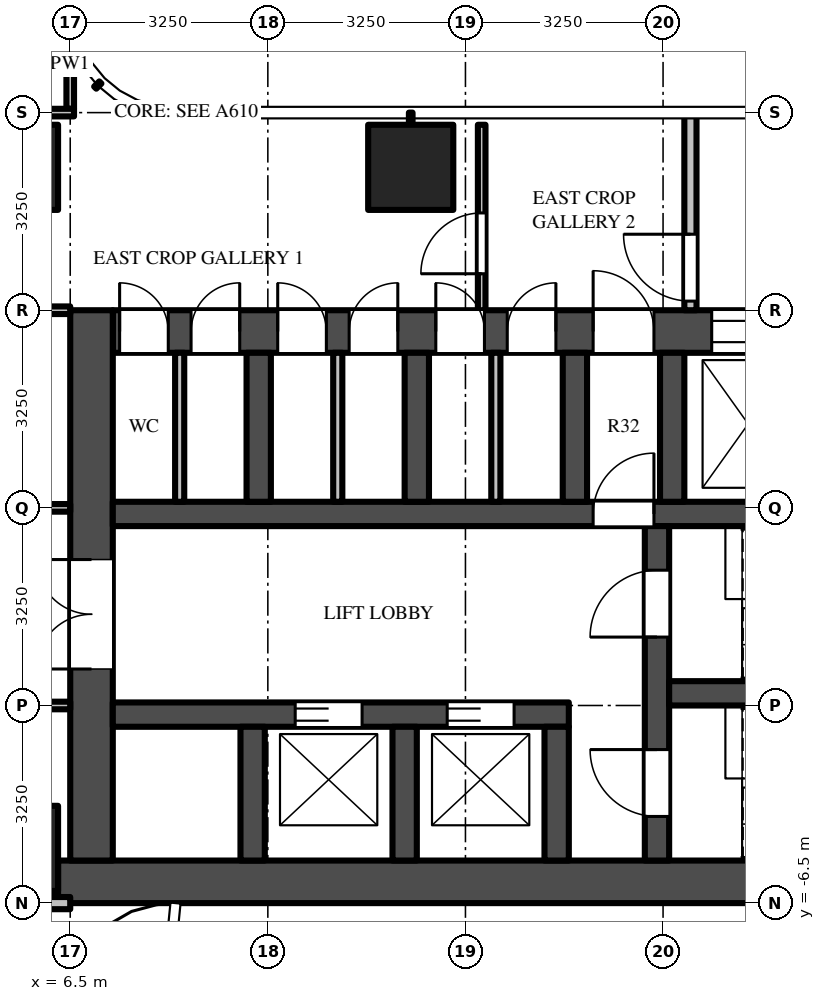
"""IFC4 building model, lengths in metres.
Left out: names, types, materials, properties, quantities, classifications, styles, units other than length and angle.
Written with IfcOpenShell. Run it as: python <this file> out.ifc"""

import sys

from ifc_helpers import new_model, si_unit, direction, frame, frame_2d, origin, origin_2d, place, context, subcontext, project, spatial, rectangle, extrude, source, transform, mapped, element, fill, save


model = new_model("IFC4")
c1 = context("Model", 3, precision=1e-05, world=origin(), true_north=direction((0.0, 1.0)))
c2 = subcontext(c1, "Body", "Model", "MODEL_VIEW")
j1 = project(units=[si_unit("LENGTHUNIT", "METRE"), si_unit("PLANEANGLEUNIT", "RADIAN")], contexts=[c1])
p1 = place(None, origin())
s1 = spatial("IfcSite", under=j1, at=p1, CompositionType="ELEMENT")
p2 = place(p1, origin())
s2 = spatial("IfcBuilding", under=s1, at=p2, CompositionType="ELEMENT")
p3 = place(p2, frame((0.0, 0.0, 83.5)))
s3 = spatial("IfcBuildingStorey", under=s2, at=p3, CompositionType="ELEMENT", Elevation=83.5)
m1 = source(origin(), c2, "Body", "SweptSolid", [
    extrude(rectangle(XDim=1.4, YDim=1.4, at=origin_2d()), origin(), (0.0, 0.0, 1.0), 4.5),
])
for number, where, z_axis, x_axis in (
    (1, (12.1, 5.6, 0.0), (0.0, 0.0, 1.0), (1.0, 0.0, 0.0)),
    (2, (5.6, 5.6, 0.0), (0.0, 0.0, 1.0), (1.0, 0.0, 0.0)),
    (3, (5.6, -5.6, 0.0), (0.0, 0.0, 1.0), (1.0, 0.0, 0.0)),
):
    element("IfcColumn", number, at=place(p3, frame(where, z_axis=z_axis, x_axis=x_axis)), inside=s3, PredefinedType="COLUMN", context=c2, shape_type="MappedRepresentation", body=[
        mapped(m1, transform((0.0, 0.0, 0.0))),
    ])
m2 = source(origin(), c2, "Body", "SweptSolid", [
    extrude(rectangle(XDim=16.45, YDim=0.7, at=frame_2d((8.225, 0.0))), origin(), (0.0, 0.0, 1.0), 4.25),
])
p4 = place(p3, frame((6.3, -6.15, 0.0), z_axis=(0.0, 0.0, 1.0), x_axis=(1.0, 0.0, 0.0)))
e4 = element("IfcWall", 4, at=p4, inside=s3, PredefinedType="SHEAR", context=c2, shape_type="MappedRepresentation", body=[
    mapped(m2, transform((0.0, 0.0, 0.0))),
])
m3 = source(origin(), c2, "Body", "SweptSolid", [
    extrude(rectangle(XDim=14.85, YDim=0.7, at=frame_2d((7.425, 0.0))), origin(), (0.0, 0.0, 1.0), 4.25),
])
p5 = place(p3, frame((7.2, 2.9, 0.0), z_axis=(0.0, 0.0, 1.0), x_axis=(1.0, 0.0, 0.0)))
e5 = element("IfcWall", 5, at=p5, inside=s3, PredefinedType="SHEAR", context=c2, shape_type="MappedRepresentation", body=[
    mapped(m3, transform((0.0, 0.0, 0.0))),
])
m4 = source(origin(), c2, "Body", "SweptSolid", [
    extrude(rectangle(XDim=1.3, YDim=2.1, at=frame_2d((0.65, 1.05))), frame((0.0, 0.36, 0.0), z_axis=(0.0, -1.0, 0.0), x_axis=(1.0, 0.0, 0.0)), (0.0, 0.0, 1.0), 0.72),
])
p6 = place(p5, frame((12.2, 0.0, 0.0)))
e6 = element("IfcOpeningElement", 6, at=p6, cuts=e5, PredefinedType="OPENING", context=c2, shape_type="MappedRepresentation", body=[
    mapped(m4, transform((0.0, 0.0, 0.0))),
])
m5 = source(origin(), c2, "Body", "SweptSolid", [
    extrude(rectangle(XDim=1.2, YDim=2.1, at=frame_2d((0.6, 1.05))), frame((0.0, 0.36, 0.0), z_axis=(0.0, -1.0, 0.0), x_axis=(1.0, 0.0, 0.0)), (0.0, 0.0, 1.0), 0.72),
])
p7 = place(p5, frame((9.85, 0.0, 0.0)))
e7 = element("IfcOpeningElement", 7, at=p7, cuts=e5, PredefinedType="OPENING", context=c2, shape_type="MappedRepresentation", body=[
    mapped(m5, transform((0.0, 0.0, 0.0))),
])
m6 = source(origin(), c2, "Body", "SweptSolid", [
    extrude(rectangle(XDim=1.0, YDim=2.1, at=frame_2d((0.5, 1.05))), frame((0.0, 0.36, 0.0), z_axis=(0.0, -1.0, 0.0), x_axis=(1.0, 0.0, 0.0)), (0.0, 0.0, 1.0), 0.72),
])
p8 = place(p5, frame((7.9, 0.0, 0.0)))
e8 = element("IfcOpeningElement", 8, at=p8, cuts=e5, PredefinedType="OPENING", context=c2, shape_type="MappedRepresentation", body=[
    mapped(m6, transform((0.0, 0.0, 0.0))),
])
m7 = source(origin(), c2, "Body", "SweptSolid", [
    extrude(rectangle(XDim=0.8, YDim=2.1, at=frame_2d((0.4, 1.05))), frame((0.0, 0.36, 0.0), z_axis=(0.0, -1.0, 0.0), x_axis=(1.0, 0.0, 0.0)), (0.0, 0.0, 1.0), 0.72),
])
p9 = place(p5, frame((0.113, 0.0, 0.0)))
e9 = element("IfcOpeningElement", 9, at=p9, cuts=e5, PredefinedType="OPENING", context=c2, shape_type="MappedRepresentation", body=[
    mapped(m7, transform((0.0, 0.0, 0.0))),
])
p10 = place(p5, frame((1.288, 0.0, 0.0)))
e10 = element("IfcOpeningElement", 10, at=p10, cuts=e5, PredefinedType="OPENING", context=c2, shape_type="MappedRepresentation", body=[
    mapped(m7, transform((0.0, 0.0, 0.0))),
])
p11 = place(p5, frame((2.712, 0.0, 0.0)))
e11 = element("IfcOpeningElement", 11, at=p11, cuts=e5, PredefinedType="OPENING", context=c2, shape_type="MappedRepresentation", body=[
    mapped(m7, transform((0.0, 0.0, 0.0))),
])
p12 = place(p5, frame((3.887, 0.0, 0.0)))
e12 = element("IfcOpeningElement", 12, at=p12, cuts=e5, PredefinedType="OPENING", context=c2, shape_type="MappedRepresentation", body=[
    mapped(m7, transform((0.0, 0.0, 0.0))),
])
p13 = place(p5, frame((5.312, 0.0, 0.0)))
e13 = element("IfcOpeningElement", 13, at=p13, cuts=e5, PredefinedType="OPENING", context=c2, shape_type="MappedRepresentation", body=[
    mapped(m7, transform((0.0, 0.0, 0.0))),
])
p14 = place(p5, frame((6.488, 0.0, 0.0)))
e14 = element("IfcOpeningElement", 14, at=p14, cuts=e5, PredefinedType="OPENING", context=c2, shape_type="MappedRepresentation", body=[
    mapped(m7, transform((0.0, 0.0, 0.0))),
])
m8 = source(origin(), c2, "Body", "SweptSolid", [
    extrude(rectangle(XDim=9.05, YDim=0.7, at=frame_2d((4.525, 0.0))), origin(), (0.0, 0.0, 1.0), 4.25),
])
p15 = place(p3, frame((6.85, -5.8, 0.0), z_axis=(0.0, 0.0, 1.0), x_axis=(0.0, 1.0, 0.0)))
e15 = element("IfcWall", 15, at=p15, inside=s3, PredefinedType="SHEAR", context=c2, shape_type="MappedRepresentation", body=[
    mapped(m8, transform((0.0, 0.0, 0.0))),
])
m9 = source(origin(), c2, "Body", "SweptSolid", [
    extrude(rectangle(XDim=1.8, YDim=2.1, at=frame_2d((0.9, 1.05))), frame((0.0, 0.36, 0.0), z_axis=(0.0, -1.0, 0.0), x_axis=(1.0, 0.0, 0.0)), (0.0, 0.0, 1.0), 0.72),
])
p16 = place(p15, frame((3.15, 0.0, 0.0)))
e16 = element("IfcOpeningElement", 16, at=p16, cuts=e15, PredefinedType="OPENING", context=c2, shape_type="MappedRepresentation", body=[
    mapped(m9, transform((0.0, 0.0, 0.0))),
])
m10 = source(origin(), c2, "Body", "SweptSolid", [
    extrude(rectangle(XDim=7.5, YDim=0.4, at=frame_2d((3.75, 0.0))), origin(), (0.0, 0.0, 1.0), 4.25),
])
p17 = place(p3, frame((7.2, -3.4, 0.0), z_axis=(0.0, 0.0, 1.0), x_axis=(1.0, 0.0, 0.0)))
e17 = element("IfcWall", 17, at=p17, inside=s3, PredefinedType="SHEAR", context=c2, shape_type="MappedRepresentation", body=[
    mapped(m10, transform((0.0, 0.0, 0.0))),
])
m11 = source(origin(), c2, "Body", "SweptSolid", [
    extrude(rectangle(XDim=1.1, YDim=2.1, at=frame_2d((0.55, 1.05))), frame((0.0, 0.21, 0.0), z_axis=(0.0, -1.0, 0.0), x_axis=(1.0, 0.0, 0.0)), (0.0, 0.0, 1.0), 0.42),
])
p18 = place(p17, frame((3.0, 0.0, 0.0)))
e18 = element("IfcOpeningElement", 18, at=p18, cuts=e17, PredefinedType="OPENING", context=c2, shape_type="MappedRepresentation", body=[
    mapped(m11, transform((0.0, 0.0, 0.0))),
])
p19 = place(p17, frame((5.5, 0.0, 0.0)))
e19 = element("IfcOpeningElement", 19, at=p19, cuts=e17, PredefinedType="OPENING", context=c2, shape_type="MappedRepresentation", body=[
    mapped(m11, transform((0.0, 0.0, 0.0))),
])
m12 = source(origin(), c2, "Body", "SweptSolid", [
    extrude(rectangle(XDim=14.85, YDim=0.4, at=frame_2d((7.425, 0.0))), origin(), (0.0, 0.0, 1.0), 4.25),
])
p20 = place(p3, frame((7.2, -0.1, 0.0), z_axis=(0.0, 0.0, 1.0), x_axis=(1.0, 0.0, 0.0)))
e20 = element("IfcWall", 20, at=p20, inside=s3, PredefinedType="SHEAR", context=c2, shape_type="MappedRepresentation", body=[
    mapped(m12, transform((0.0, 0.0, 0.0))),
])
m13 = source(origin(), c2, "Body", "SweptSolid", [
    extrude(rectangle(XDim=1.0, YDim=2.1, at=frame_2d((0.5, 1.05))), frame((0.0, 0.21, 0.0), z_axis=(0.0, -1.0, 0.0), x_axis=(1.0, 0.0, 0.0)), (0.0, 0.0, 1.0), 0.42),
])
p21 = place(p20, frame((7.9, 0.0, 0.0)))
e21 = element("IfcOpeningElement", 21, at=p21, cuts=e20, PredefinedType="OPENING", context=c2, shape_type="MappedRepresentation", body=[
    mapped(m13, transform((0.0, 0.0, 0.0))),
])
m14 = source(origin(), c2, "Body", "SweptSolid", [
    extrude(rectangle(XDim=5.5, YDim=0.4, at=frame_2d((2.75, 0.0))), origin(), (0.0, 0.0, 1.0), 4.25),
])
p22 = place(p3, frame((16.15, -5.8, 0.0), z_axis=(0.0, 0.0, 1.0), x_axis=(0.0, 1.0, 0.0)))
e22 = element("IfcWall", 22, at=p22, inside=s3, PredefinedType="SHEAR", context=c2, shape_type="MappedRepresentation", body=[
    mapped(m14, transform((0.0, 0.0, 0.0))),
])
p23 = place(p22, frame((0.725, 0.0, 0.0)))
e23 = element("IfcOpeningElement", 23, at=p23, cuts=e22, PredefinedType="OPENING", context=c2, shape_type="MappedRepresentation", body=[
    mapped(m11, transform((0.0, 0.0, 0.0))),
])
p24 = place(p22, frame((3.675, 0.0, 0.0)))
e24 = element("IfcOpeningElement", 24, at=p24, cuts=e22, PredefinedType="OPENING", context=c2, shape_type="MappedRepresentation", body=[
    mapped(m11, transform((0.0, 0.0, 0.0))),
])
m15 = source(origin(), c2, "Body", "SweptSolid", [
    extrude(rectangle(XDim=5.7, YDim=0.4, at=frame_2d((2.85, 0.0))), origin(), (0.0, 0.0, 1.0), 4.25),
])
p25 = place(p3, frame((16.35, -3.05, 0.0), z_axis=(0.0, 0.0, 1.0), x_axis=(1.0, 0.0, 0.0)))
e25 = element("IfcWall", 25, at=p25, inside=s3, PredefinedType="SHEAR", context=c2, shape_type="MappedRepresentation", body=[
    mapped(m15, transform((0.0, 0.0, 0.0))),
])
m16 = source(origin(), c2, "Body", "SweptSolid", [
    extrude(rectangle(XDim=2.2, YDim=0.4, at=frame_2d((1.1, 0.0))), origin(), (0.0, 0.0, 1.0), 4.25),
])
for number, where, z_axis, x_axis in (
    (26, (9.5, -5.8, 0.0), (0.0, 0.0, 1.0), (0.0, 1.0, 0.0)),
    (27, (12.0, -5.8, 0.0), (0.0, 0.0, 1.0), (0.0, 1.0, 0.0)),
    (28, (14.5, -5.8, 0.0), (0.0, 0.0, 1.0), (0.0, 1.0, 0.0)),
):
    element("IfcWall", number, at=place(p3, frame(where, z_axis=z_axis, x_axis=x_axis)), inside=s3, PredefinedType="SHEAR", context=c2, shape_type="MappedRepresentation", body=[
        mapped(m16, transform((0.0, 0.0, 0.0))),
    ])
m17 = source(origin(), c2, "Body", "SweptSolid", [
    extrude(rectangle(XDim=2.45, YDim=0.4, at=frame_2d((1.225, 0.0))), origin(), (0.0, 0.0, 1.0), 4.25),
])
for number, where, z_axis, x_axis in (
    (29, (9.6, 0.1, 0.0), (0.0, 0.0, 1.0), (0.0, 1.0, 0.0)),
    (30, (12.2, 0.1, 0.0), (0.0, 0.0, 1.0), (0.0, 1.0, 0.0)),
    (31, (14.8, 0.1, 0.0), (0.0, 0.0, 1.0), (0.0, 1.0, 0.0)),
    (32, (16.4, 0.1, 0.0), (0.0, 0.0, 1.0), (0.0, 1.0, 0.0)),
):
    element("IfcWall", number, at=place(p3, frame(where, z_axis=z_axis, x_axis=x_axis)), inside=s3, PredefinedType="SHEAR", context=c2, shape_type="MappedRepresentation", body=[
        mapped(m17, transform((0.0, 0.0, 0.0))),
    ])
m18 = source(origin(), c2, "Body", "SweptSolid", [
    extrude(rectangle(XDim=3.25, YDim=0.2, at=frame_2d((1.625, 0.0))), origin(), (0.0, 0.0, 1.0), 4.25),
])
p26 = place(p3, frame((16.7, 3.25, 0.0), z_axis=(0.0, 0.0, 1.0), x_axis=(0.0, 1.0, 0.0)))
e33 = element("IfcWall", 33, at=p26, inside=s3, PredefinedType="PARTITIONING", context=c2, shape_type="MappedRepresentation", body=[
    mapped(m18, transform((0.0, 0.0, 0.0))),
])
m19 = source(origin(), c2, "Body", "SweptSolid", [
    extrude(rectangle(XDim=1.1, YDim=2.1, at=frame_2d((0.55, 1.05))), frame((0.0, 0.11, 0.0), z_axis=(0.0, -1.0, 0.0), x_axis=(1.0, 0.0, 0.0)), (0.0, 0.0, 1.0), 0.22),
])
p27 = place(p26, frame((0.15, 0.0, 0.0)))
e34 = element("IfcOpeningElement", 34, at=p27, cuts=e33, PredefinedType="OPENING", context=c2, shape_type="MappedRepresentation", body=[
    mapped(m19, transform((0.0, 0.0, 0.0))),
])
m20 = source(origin(), c2, "Body", "SweptSolid", [
    extrude(rectangle(XDim=2.45, YDim=0.15, at=frame_2d((1.225, 0.0))), origin(), (0.0, 0.0, 1.0), 4.25),
])
for number, where, z_axis, x_axis in (
    (35, (8.3, 0.1, 0.0), (0.0, 0.0, 1.0), (0.0, 1.0, 0.0)),
    (36, (10.9, 0.1, 0.0), (0.0, 0.0, 1.0), (0.0, 1.0, 0.0)),
    (37, (13.5, 0.1, 0.0), (0.0, 0.0, 1.0), (0.0, 1.0, 0.0)),
):
    element("IfcWall", number, at=place(p3, frame(where, z_axis=z_axis, x_axis=x_axis)), inside=s3, PredefinedType="PARTITIONING", context=c2, shape_type="MappedRepresentation", body=[
        mapped(m20, transform((0.0, 0.0, 0.0))),
    ])
m21 = source(origin(), c2, "Body", "SweptSolid", [
    extrude(rectangle(XDim=1.469, YDim=0.125, at=frame_2d((0.734, 0.0))), origin(), (0.0, 0.0, 1.0), 4.25),
])
p28 = place(p3, frame((6.5, 6.562, 0.0), z_axis=(0.0, 0.0, 1.0), x_axis=(0.0, 1.0, 0.0)))
e38 = element("IfcWall", 38, at=p28, inside=s3, PredefinedType="PARTITIONING", context=c2, shape_type="MappedRepresentation", body=[
    mapped(m21, transform((0.0, 0.0, 0.0))),
])
m22 = source(origin(), c2, "Body", "SweptSolid", [
    extrude(rectangle(XDim=3.05, YDim=0.125, at=frame_2d((1.525, 0.0))), origin(), (0.0, 0.0, 1.0), 3.33),
])
p29 = place(p3, frame((13.267, 3.25, 0.0), z_axis=(0.0, 0.0, 1.0), x_axis=(0.0, 1.0, 0.0)))
e39 = element("IfcWall", 39, at=p29, inside=s3, PredefinedType="PARTITIONING", context=c2, shape_type="MappedRepresentation", body=[
    mapped(m22, transform((0.0, 0.0, 0.0))),
])
m23 = source(origin(), c2, "Body", "SweptSolid", [
    extrude(rectangle(XDim=1.0, YDim=2.1, at=frame_2d((0.5, 1.05))), frame((0.0, 0.073, 0.0), z_axis=(0.0, -1.0, 0.0), x_axis=(1.0, 0.0, 0.0)), (0.0, 0.0, 1.0), 0.145),
])
p30 = place(p29, frame((0.6, 0.0, 0.0)))
e40 = element("IfcOpeningElement", 40, at=p30, cuts=e39, PredefinedType="OPENING", context=c2, shape_type="MappedRepresentation", body=[
    mapped(m23, transform((0.0, 0.0, 0.0))),
])
m24 = source(origin(), c2, "Body", "SweptSolid", [
    extrude(rectangle(XDim=5.238, YDim=0.2, at=frame_2d((2.619, 0.0))), origin(), (0.0, 0.0, 1.0), 3.33),
])
p31 = place(p3, frame((1.262, -6.5, 0.0), z_axis=(0.0, 0.0, 1.0), x_axis=(1.0, 0.0, 0.0)))
e41 = element("IfcWall", 41, at=p31, inside=s3, PredefinedType="PARTITIONING", context=c2, shape_type="MappedRepresentation", body=[
    mapped(m24, transform((0.0, 0.0, 0.0))),
])
m25 = source(origin(), c2, "Body", "SweptSolid", [
    extrude(rectangle(XDim=5.363, YDim=0.125, at=frame_2d((2.681, 0.0))), origin(), (0.0, 0.0, 1.0), 3.468),
])
p32 = place(p3, frame((6.5, -3.25, 0.0), z_axis=(0.0, 0.0, 1.0), x_axis=(-1.0, 0.0, 0.0)))
e42 = element("IfcWall", 42, at=p32, inside=s3, PredefinedType="PARTITIONING", context=c2, shape_type="MappedRepresentation", body=[
    mapped(m25, transform((0.0, 0.0, 0.0))),
])
m26 = source(origin(), c2, "Body", "SweptSolid", [
    extrude(rectangle(XDim=1.1, YDim=2.1, at=frame_2d((0.55, 1.05))), frame((0.0, 0.073, 0.0), z_axis=(0.0, -1.0, 0.0), x_axis=(1.0, 0.0, 0.0)), (0.0, 0.0, 1.0), 0.145),
])
p33 = place(p32, frame((0.35, 0.0, 0.0)))
e43 = element("IfcOpeningElement", 43, at=p33, cuts=e42, PredefinedType="OPENING", context=c2, shape_type="MappedRepresentation", body=[
    mapped(m26, transform((0.0, 0.0, 0.0))),
])
p34 = place(p3, frame((6.5, 0.0, 0.0), z_axis=(0.0, 0.0, 1.0), x_axis=(-1.0, 0.0, 0.0)))
e44 = element("IfcWall", 44, at=p34, inside=s3, PredefinedType="PARTITIONING", context=c2, shape_type="MappedRepresentation", body=[
    mapped(m25, transform((0.0, 0.0, 0.0))),
])
p35 = place(p34, frame((3.95, 0.0, 0.0)))
e45 = element("IfcOpeningElement", 45, at=p35, cuts=e44, PredefinedType="OPENING", context=c2, shape_type="MappedRepresentation", body=[
    mapped(m23, transform((0.0, 0.0, 0.0))),
])
p36 = place(p3, frame((1.137, 3.25, 0.0), z_axis=(0.0, 0.0, 1.0), x_axis=(1.0, 0.0, 0.0)))
e46 = element("IfcWall", 46, at=p36, inside=s3, PredefinedType="PARTITIONING", context=c2, shape_type="MappedRepresentation", body=[
    mapped(m25, transform((0.0, 0.0, 0.0))),
])
m27 = source(origin(), c2, "Body", "SweptSolid", [
    extrude(rectangle(XDim=5.425, YDim=0.125, at=frame_2d((2.712, 0.0))), origin(), (0.0, 0.0, 1.0), 3.33),
])
p37 = place(p3, frame((1.137, 6.5, 0.0), z_axis=(0.0, 0.0, 1.0), x_axis=(1.0, 0.0, 0.0)))
e47 = element("IfcWall", 47, at=p37, inside=s3, PredefinedType="PARTITIONING", context=c2, shape_type="MappedRepresentation", body=[
    mapped(m27, transform((0.0, 0.0, 0.0))),
])
m28 = source(origin(), c2, "Body", "SweptSolid", [
    extrude(rectangle(XDim=1.1, YDim=2.1, at=frame_2d((0.55, 1.05))), frame((0.0, 0.025, 0.0), z_axis=(0.0, -1.0, 0.0), x_axis=(1.0, 0.0, 0.0)), (0.0, 0.0, 1.0), 0.05),
])
p38 = place(p18, origin())
e48 = element("IfcDoor", 48, at=p38, inside=s3, OperationType="DOUBLE_DOOR_SLIDING", PredefinedType="DOOR", context=c2, shape_type="MappedRepresentation", body=[
    mapped(m28, transform((0.0, 0.0, 0.0))),
])
fill(e18, e48)
p39 = place(p19, origin())
e49 = element("IfcDoor", 49, at=p39, inside=s3, OperationType="DOUBLE_DOOR_SLIDING", PredefinedType="DOOR", context=c2, shape_type="MappedRepresentation", body=[
    mapped(m28, transform((0.0, 0.0, 0.0))),
])
fill(e19, e49)
m29 = source(origin(), c2, "Body", "SweptSolid", [
    extrude(rectangle(XDim=1.2, YDim=2.1, at=frame_2d((0.6, 1.05))), frame((0.0, -0.275, 0.0), z_axis=(0.0, -1.0, 0.0), x_axis=(1.0, 0.0, 0.0)), (0.0, 0.0, 1.0), 0.05),
])
p40 = place(p7, origin())
e50 = element("IfcDoor", 50, at=p40, inside=s3, OperationType="DOUBLE_DOOR_SLIDING", PredefinedType="DOOR", context=c2, shape_type="MappedRepresentation", body=[
    mapped(m29, transform((0.0, 0.0, 0.0))),
])
fill(e7, e50)
m30 = source(origin(), c2, "Body", "SweptSolid", [
    extrude(rectangle(XDim=1.8, YDim=2.1, at=frame_2d((0.9, 1.05))), frame((0.0, -0.275, 0.0), z_axis=(0.0, -1.0, 0.0), x_axis=(1.0, 0.0, 0.0)), (0.0, 0.0, 1.0), 0.05),
])
p41 = place(p16, origin())
e51 = element("IfcDoor", 51, at=p41, inside=s3, OperationType="DOUBLE_DOOR_SINGLE_SWING", PredefinedType="DOOR", context=c2, shape_type="MappedRepresentation", body=[
    mapped(m30, transform((0.0, 0.0, 0.0))),
])
fill(e16, e51)
p42 = place(p23, origin())
e52 = element("IfcDoor", 52, at=p42, inside=s3, OperationType="SINGLE_SWING_RIGHT", PredefinedType="DOOR", context=c2, shape_type="MappedRepresentation", body=[
    mapped(m28, transform((0.0, 0.0, 0.0))),
])
fill(e23, e52)
p43 = place(p24, origin())
e53 = element("IfcDoor", 53, at=p43, inside=s3, OperationType="SINGLE_SWING_LEFT", PredefinedType="DOOR", context=c2, shape_type="MappedRepresentation", body=[
    mapped(m28, transform((0.0, 0.0, 0.0))),
])
fill(e24, e53)
m31 = source(origin(), c2, "Body", "SweptSolid", [
    extrude(rectangle(XDim=1.0, YDim=2.1, at=frame_2d((0.5, 1.05))), frame((0.0, 0.025, 0.0), z_axis=(0.0, -1.0, 0.0), x_axis=(1.0, 0.0, 0.0)), (0.0, 0.0, 1.0), 0.05),
])
p44 = place(p21, origin())
e54 = element("IfcDoor", 54, at=p44, inside=s3, OperationType="SINGLE_SWING_RIGHT", PredefinedType="DOOR", context=c2, shape_type="MappedRepresentation", body=[
    mapped(m31, transform((0.0, 0.0, 0.0))),
])
fill(e21, e54)
m32 = source(origin(), c2, "Body", "SweptSolid", [
    extrude(rectangle(XDim=1.0, YDim=2.1, at=frame_2d((0.5, 1.05))), frame((0.0, -0.275, 0.0), z_axis=(0.0, -1.0, 0.0), x_axis=(1.0, 0.0, 0.0)), (0.0, 0.0, 1.0), 0.05),
])
p45 = place(p8, origin())
e55 = element("IfcDoor", 55, at=p45, inside=s3, OperationType="SINGLE_SWING_LEFT", PredefinedType="DOOR", context=c2, shape_type="MappedRepresentation", body=[
    mapped(m32, transform((0.0, 0.0, 0.0))),
])
fill(e8, e55)
p46 = place(p27, origin())
e56 = element("IfcDoor", 56, at=p46, inside=s3, OperationType="SINGLE_SWING_RIGHT", PredefinedType="DOOR", context=c2, shape_type="MappedRepresentation", body=[
    mapped(m28, transform((0.0, 0.0, 0.0))),
])
fill(e34, e56)
m33 = source(origin(), c2, "Body", "SweptSolid", [
    extrude(rectangle(XDim=0.8, YDim=2.1, at=frame_2d((0.4, 1.05))), frame((0.0, -0.275, 0.0), z_axis=(0.0, -1.0, 0.0), x_axis=(1.0, 0.0, 0.0)), (0.0, 0.0, 1.0), 0.05),
])
p47 = place(p9, origin())
e57 = element("IfcDoor", 57, at=p47, inside=s3, OperationType="SINGLE_SWING_LEFT", PredefinedType="DOOR", context=c2, shape_type="MappedRepresentation", body=[
    mapped(m33, transform((0.0, 0.0, 0.0))),
])
fill(e9, e57)
p48 = place(p10, origin())
e58 = element("IfcDoor", 58, at=p48, inside=s3, OperationType="SINGLE_SWING_RIGHT", PredefinedType="DOOR", context=c2, shape_type="MappedRepresentation", body=[
    mapped(m33, transform((0.0, 0.0, 0.0))),
])
fill(e10, e58)
p49 = place(p11, origin())
e59 = element("IfcDoor", 59, at=p49, inside=s3, OperationType="SINGLE_SWING_LEFT", PredefinedType="DOOR", context=c2, shape_type="MappedRepresentation", body=[
    mapped(m33, transform((0.0, 0.0, 0.0))),
])
fill(e11, e59)
p50 = place(p12, origin())
e60 = element("IfcDoor", 60, at=p50, inside=s3, OperationType="SINGLE_SWING_RIGHT", PredefinedType="DOOR", context=c2, shape_type="MappedRepresentation", body=[
    mapped(m33, transform((0.0, 0.0, 0.0))),
])
fill(e12, e60)
p51 = place(p13, origin())
e61 = element("IfcDoor", 61, at=p51, inside=s3, OperationType="SINGLE_SWING_LEFT", PredefinedType="DOOR", context=c2, shape_type="MappedRepresentation", body=[
    mapped(m33, transform((0.0, 0.0, 0.0))),
])
fill(e13, e61)
p52 = place(p14, origin())
e62 = element("IfcDoor", 62, at=p52, inside=s3, OperationType="SINGLE_SWING_RIGHT", PredefinedType="DOOR", context=c2, shape_type="MappedRepresentation", body=[
    mapped(m33, transform((0.0, 0.0, 0.0))),
])
fill(e14, e62)
p53 = place(p30, origin())
e63 = element("IfcDoor", 63, at=p53, inside=s3, OperationType="SINGLE_SWING_LEFT", PredefinedType="DOOR", context=c2, shape_type="MappedRepresentation", body=[
    mapped(m31, transform((0.0, 0.0, 0.0))),
])
fill(e40, e63)
save(model, sys.argv[1])
